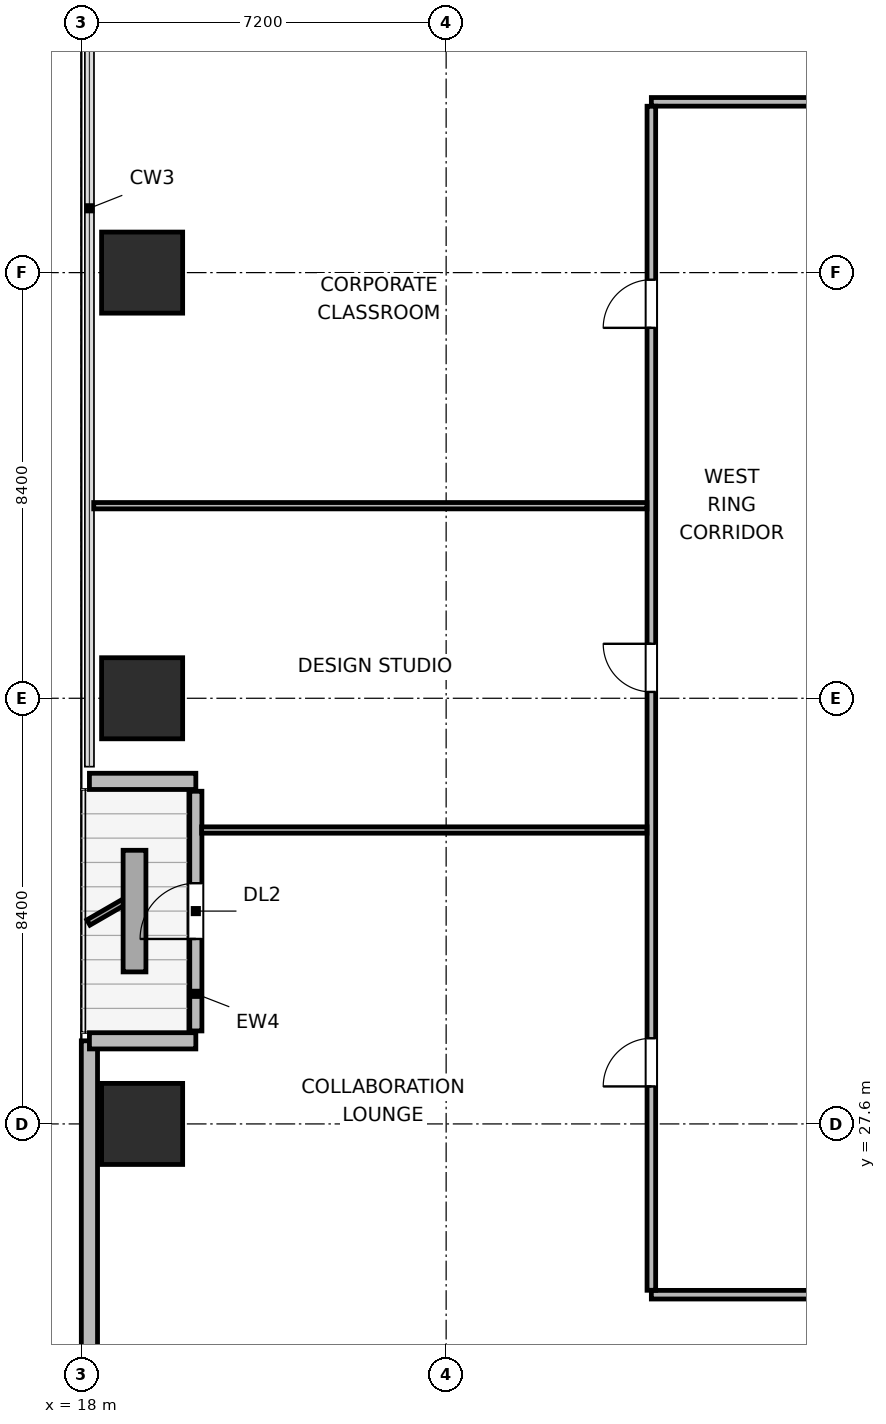
"""IFC4 building model, lengths in metres.
Left out: names, types, materials, properties, quantities, classifications, styles, units other than length and angle.
Written with IfcOpenShell. Run it as: python <this file> out.ifc"""

import sys

from ifc_helpers import new_model, si_unit, direction, frame, frame_2d, origin, origin_2d, place, context, subcontext, project, spatial, rectangle, extrude, element, fill, save


model = new_model("IFC4")
c1 = context("Model", 3, precision=1e-05, world=origin(), true_north=direction((0.0, 1.0)))
c2 = subcontext(c1, "Body", "Model", "MODEL_VIEW")
j1 = project(units=[si_unit("LENGTHUNIT", "METRE"), si_unit("PLANEANGLEUNIT", "RADIAN")], contexts=[c1])
p1 = place(None, origin())
s1 = spatial("IfcSite", under=j1, at=p1, CompositionType="ELEMENT")
p2 = place(p1, origin())
s2 = spatial("IfcBuilding", under=s1, at=p2, CompositionType="ELEMENT")
p3 = place(p2, frame((0.0, 0.0, 85.8)))
s3 = spatial("IfcBuildingStorey", under=s2, at=p3, CompositionType="ELEMENT", Elevation=85.8)
for number, where, z_axis, x_axis in (
    (1, (19.2, 27.6, 0.0), (0.0, 0.0, 1.0), (1.0, 0.0, 0.0)),
    (2, (19.2, 36.0, 0.0), (0.0, 0.0, 1.0), (1.0, 0.0, 0.0)),
    (3, (19.2, 44.4, 0.0), (0.0, 0.0, 1.0), (1.0, 0.0, 0.0)),
):
    element("IfcColumn", number, at=place(p3, frame(where, z_axis=z_axis, x_axis=x_axis)), inside=s3, PredefinedType="COLUMN", context=c2, shape_type="SweptSolid", body=[
        extrude(rectangle(XDim=1.6, YDim=1.6, at=origin_2d()), origin(), (0.0, 0.0, 1.0), 3.9),
    ])
p4 = place(p3, frame((18.16, 15.021, 0.0), z_axis=(0.0, 0.0, 1.0), x_axis=(0.0, 1.0, 0.0)))
e4 = element("IfcWall", 4, at=p4, inside=s3, PredefinedType="SOLIDWALL", context=c2, shape_type="SweptSolid", body=[
    extrude(rectangle(XDim=14.219, YDim=0.32, at=frame_2d((7.109, 0.0))), origin(), (0.0, 0.0, 1.0), 3.64),
])
p5 = place(p3, frame((18.16, 29.24, 0.0), z_axis=(0.0, 0.0, 1.0), x_axis=(1.0, 0.0, 0.0)))
e5 = element("IfcWall", 5, at=p5, inside=s3, PredefinedType="SOLIDWALL", context=c2, shape_type="SweptSolid", body=[
    extrude(rectangle(XDim=2.1, YDim=0.32, at=frame_2d((1.05, 0.0))), origin(), (0.0, 0.0, 1.0), 2.875),
])
p6 = place(p3, frame((20.26, 29.435, 0.0), z_axis=(0.0, 0.0, 1.0), x_axis=(0.0, 1.0, 0.0)))
e6 = element("IfcWall", 6, at=p6, inside=s3, PredefinedType="SOLIDWALL", context=c2, shape_type="SweptSolid", body=[
    extrude(rectangle(XDim=4.73, YDim=0.24, at=frame_2d((2.365, 0.0))), origin(), (0.0, 0.0, 1.0), 3.162),
])
p7 = place(p6, frame((1.815, 0.0, 0.0)))
e7 = element("IfcOpeningElement", 7, at=p7, cuts=e6, PredefinedType="OPENING", context=c2, shape_type="SweptSolid", body=[
    extrude(rectangle(XDim=1.1, YDim=2.04, at=frame_2d((0.55, 1.02))), frame((0.0, 0.13, 0.0), z_axis=(0.0, -1.0, 0.0), x_axis=(1.0, 0.0, 0.0)), (0.0, 0.0, 1.0), 0.26),
])
p8 = place(p3, frame((20.26, 34.36, 0.0), z_axis=(0.0, 0.0, 1.0), x_axis=(-1.0, 0.0, 0.0)))
e8 = element("IfcWall", 8, at=p8, inside=s3, PredefinedType="SOLIDWALL", context=c2, shape_type="SweptSolid", body=[
    extrude(rectangle(XDim=2.1, YDim=0.32, at=frame_2d((1.05, 0.0))), origin(), (0.0, 0.0, 1.0), 2.875),
])
p9 = place(p3, frame((29.25, 24.23, 0.0), z_axis=(0.0, 0.0, 1.0), x_axis=(1.0, 0.0, 0.0)))
e9 = element("IfcWall", 9, at=p9, inside=s3, PredefinedType="PARTITIONING", context=c2, shape_type="SweptSolid", body=[
    extrude(rectangle(XDim=37.5, YDim=0.17, at=frame_2d((18.75, 0.0))), origin(), (0.0, 0.0, 1.0), 3.64),
])
p10 = place(p9, frame((4.51, 0.0, 0.0)))
e10 = element("IfcOpeningElement", 10, at=p10, cuts=e9, PredefinedType="OPENING", context=c2, shape_type="SweptSolid", body=[
    extrude(rectangle(XDim=0.95, YDim=2.04, at=frame_2d((0.475, 1.02))), frame((0.0, 0.095, 0.0), z_axis=(0.0, -1.0, 0.0), x_axis=(1.0, 0.0, 0.0)), (0.0, 0.0, 1.0), 0.19),
])
p11 = place(p9, frame((13.885, 0.0, 0.0)))
e11 = element("IfcOpeningElement", 11, at=p11, cuts=e9, PredefinedType="OPENING", context=c2, shape_type="SweptSolid", body=[
    extrude(rectangle(XDim=0.95, YDim=2.04, at=frame_2d((0.475, 1.02))), frame((0.0, 0.095, 0.0), z_axis=(0.0, -1.0, 0.0), x_axis=(1.0, 0.0, 0.0)), (0.0, 0.0, 1.0), 0.19),
])
p12 = place(p9, frame((22.66, 0.0, 0.0)))
e12 = element("IfcOpeningElement", 12, at=p12, cuts=e9, PredefinedType="OPENING", context=c2, shape_type="SweptSolid", body=[
    extrude(rectangle(XDim=0.95, YDim=2.04, at=frame_2d((0.475, 1.02))), frame((0.0, 0.095, 0.0), z_axis=(0.0, -1.0, 0.0), x_axis=(1.0, 0.0, 0.0)), (0.0, 0.0, 1.0), 0.19),
])
p13 = place(p9, frame((32.035, 0.0, 0.0)))
e13 = element("IfcOpeningElement", 13, at=p13, cuts=e9, PredefinedType="OPENING", context=c2, shape_type="SweptSolid", body=[
    extrude(rectangle(XDim=0.95, YDim=2.04, at=frame_2d((0.475, 1.02))), frame((0.0, 0.095, 0.0), z_axis=(0.0, -1.0, 0.0), x_axis=(1.0, 0.0, 0.0)), (0.0, 0.0, 1.0), 0.19),
])
p14 = place(p3, frame((29.25, 47.77, 0.0), z_axis=(0.0, 0.0, 1.0), x_axis=(1.0, 0.0, 0.0)))
e14 = element("IfcWall", 14, at=p14, inside=s3, PredefinedType="PARTITIONING", context=c2, shape_type="SweptSolid", body=[
    extrude(rectangle(XDim=37.5, YDim=0.17, at=frame_2d((18.75, 0.0))), origin(), (0.0, 0.0, 1.0), 3.64),
])
p15 = place(p14, frame((4.005, 0.0, 0.0)))
e15 = element("IfcOpeningElement", 15, at=p15, cuts=e14, PredefinedType="OPENING", context=c2, shape_type="SweptSolid", body=[
    extrude(rectangle(XDim=0.95, YDim=2.04, at=frame_2d((0.475, 1.02))), frame((0.0, 0.095, 0.0), z_axis=(0.0, -1.0, 0.0), x_axis=(1.0, 0.0, 0.0)), (0.0, 0.0, 1.0), 0.19),
])
p16 = place(p14, frame((10.07, 0.0, 0.0)))
e16 = element("IfcOpeningElement", 16, at=p16, cuts=e14, PredefinedType="OPENING", context=c2, shape_type="SweptSolid", body=[
    extrude(rectangle(XDim=0.95, YDim=2.04, at=frame_2d((0.475, 1.02))), frame((0.0, 0.095, 0.0), z_axis=(0.0, -1.0, 0.0), x_axis=(1.0, 0.0, 0.0)), (0.0, 0.0, 1.0), 0.19),
])
p17 = place(p14, frame((17.165, 0.0, 0.0)))
e17 = element("IfcOpeningElement", 17, at=p17, cuts=e14, PredefinedType="OPENING", context=c2, shape_type="SweptSolid", body=[
    extrude(rectangle(XDim=0.95, YDim=2.04, at=frame_2d((0.475, 1.02))), frame((0.0, 0.095, 0.0), z_axis=(0.0, -1.0, 0.0), x_axis=(1.0, 0.0, 0.0)), (0.0, 0.0, 1.0), 0.19),
])
p18 = place(p14, frame((25.37, 0.0, 0.0)))
e18 = element("IfcOpeningElement", 18, at=p18, cuts=e14, PredefinedType="OPENING", context=c2, shape_type="SweptSolid", body=[
    extrude(rectangle(XDim=0.95, YDim=2.04, at=frame_2d((0.475, 1.02))), frame((0.0, 0.095, 0.0), z_axis=(0.0, -1.0, 0.0), x_axis=(1.0, 0.0, 0.0)), (0.0, 0.0, 1.0), 0.19),
])
p19 = place(p14, frame((32.545, 0.0, 0.0)))
e19 = element("IfcOpeningElement", 19, at=p19, cuts=e14, PredefinedType="OPENING", context=c2, shape_type="SweptSolid", body=[
    extrude(rectangle(XDim=0.95, YDim=2.04, at=frame_2d((0.475, 1.02))), frame((0.0, 0.095, 0.0), z_axis=(0.0, -1.0, 0.0), x_axis=(1.0, 0.0, 0.0)), (0.0, 0.0, 1.0), 0.19),
])
p20 = place(p3, frame((29.25, 24.317, 0.0), z_axis=(0.0, 0.0, 1.0), x_axis=(0.0, 1.0, 0.0)))
e20 = element("IfcWall", 20, at=p20, inside=s3, PredefinedType="PARTITIONING", context=c2, shape_type="SweptSolid", body=[
    extrude(rectangle(XDim=23.366, YDim=0.17, at=frame_2d((11.683, 0.0))), origin(), (0.0, 0.0, 1.0), 3.64),
])
p21 = place(p20, frame((4.023, 0.0, 0.0)))
e21 = element("IfcOpeningElement", 21, at=p21, cuts=e20, PredefinedType="OPENING", context=c2, shape_type="SweptSolid", body=[
    extrude(rectangle(XDim=0.95, YDim=2.04, at=frame_2d((0.475, 1.02))), frame((0.0, 0.095, 0.0), z_axis=(0.0, -1.0, 0.0), x_axis=(1.0, 0.0, 0.0)), (0.0, 0.0, 1.0), 0.19),
])
p22 = place(p20, frame((11.808, 0.0, 0.0)))
e22 = element("IfcOpeningElement", 22, at=p22, cuts=e20, PredefinedType="OPENING", context=c2, shape_type="SweptSolid", body=[
    extrude(rectangle(XDim=0.95, YDim=2.04, at=frame_2d((0.475, 1.02))), frame((0.0, 0.095, 0.0), z_axis=(0.0, -1.0, 0.0), x_axis=(1.0, 0.0, 0.0)), (0.0, 0.0, 1.0), 0.19),
])
p23 = place(p20, frame((18.993, 0.0, 0.0)))
e23 = element("IfcOpeningElement", 23, at=p23, cuts=e20, PredefinedType="OPENING", context=c2, shape_type="SweptSolid", body=[
    extrude(rectangle(XDim=0.95, YDim=2.04, at=frame_2d((0.475, 1.02))), frame((0.0, 0.095, 0.0), z_axis=(0.0, -1.0, 0.0), x_axis=(1.0, 0.0, 0.0)), (0.0, 0.0, 1.0), 0.19),
])
p24 = place(p3, frame((20.375, 33.4, 0.0), z_axis=(0.0, 0.0, 1.0), x_axis=(1.0, 0.0, 0.0)))
e24 = element("IfcWall", 24, at=p24, inside=s3, PredefinedType="PARTITIONING", context=c2, shape_type="SweptSolid", body=[
    extrude(rectangle(XDim=8.788, YDim=0.125, at=frame_2d((4.394, 0.0))), origin(), (0.0, 0.0, 1.0), 3.64),
])
p25 = place(p3, frame((18.245, 39.8, 0.0), z_axis=(0.0, 0.0, 1.0), x_axis=(1.0, 0.0, 0.0)))
e25 = element("IfcWall", 25, at=p25, inside=s3, PredefinedType="PARTITIONING", context=c2, shape_type="SweptSolid", body=[
    extrude(rectangle(XDim=10.918, YDim=0.125, at=frame_2d((5.459, 0.0))), origin(), (0.0, 0.0, 1.0), 3.64),
])
p26 = place(p7, origin())
e26 = element("IfcDoor", 26, at=p26, inside=s3, OperationType="SINGLE_SWING_LEFT", PredefinedType="DOOR", context=c2, shape_type="SweptSolid", body=[
    extrude(rectangle(XDim=1.1, YDim=2.04, at=frame_2d((0.55, 1.02))), frame((0.0, 0.025, 0.0), z_axis=(0.0, -1.0, 0.0), x_axis=(1.0, 0.0, 0.0)), (0.0, 0.0, 1.0), 0.05),
])
fill(e7, e26)
p27 = place(p21, origin())
e27 = element("IfcDoor", 27, at=p27, inside=s3, OperationType="SINGLE_SWING_LEFT", PredefinedType="DOOR", context=c2, shape_type="SweptSolid", body=[
    extrude(rectangle(XDim=0.95, YDim=2.04, at=frame_2d((0.475, 1.02))), frame((0.0, 0.025, 0.0), z_axis=(0.0, -1.0, 0.0), x_axis=(1.0, 0.0, 0.0)), (0.0, 0.0, 1.0), 0.05),
])
fill(e21, e27)
p28 = place(p22, origin())
e28 = element("IfcDoor", 28, at=p28, inside=s3, OperationType="SINGLE_SWING_RIGHT", PredefinedType="DOOR", context=c2, shape_type="SweptSolid", body=[
    extrude(rectangle(XDim=0.95, YDim=2.04, at=frame_2d((0.475, 1.02))), frame((0.0, 0.025, 0.0), z_axis=(0.0, -1.0, 0.0), x_axis=(1.0, 0.0, 0.0)), (0.0, 0.0, 1.0), 0.05),
])
fill(e22, e28)
p29 = place(p23, origin())
e29 = element("IfcDoor", 29, at=p29, inside=s3, OperationType="SINGLE_SWING_LEFT", PredefinedType="DOOR", context=c2, shape_type="SweptSolid", body=[
    extrude(rectangle(XDim=0.95, YDim=2.04, at=frame_2d((0.475, 1.02))), frame((0.0, 0.025, 0.0), z_axis=(0.0, -1.0, 0.0), x_axis=(1.0, 0.0, 0.0)), (0.0, 0.0, 1.0), 0.05),
])
fill(e23, e29)
save(model, sys.argv[1])
